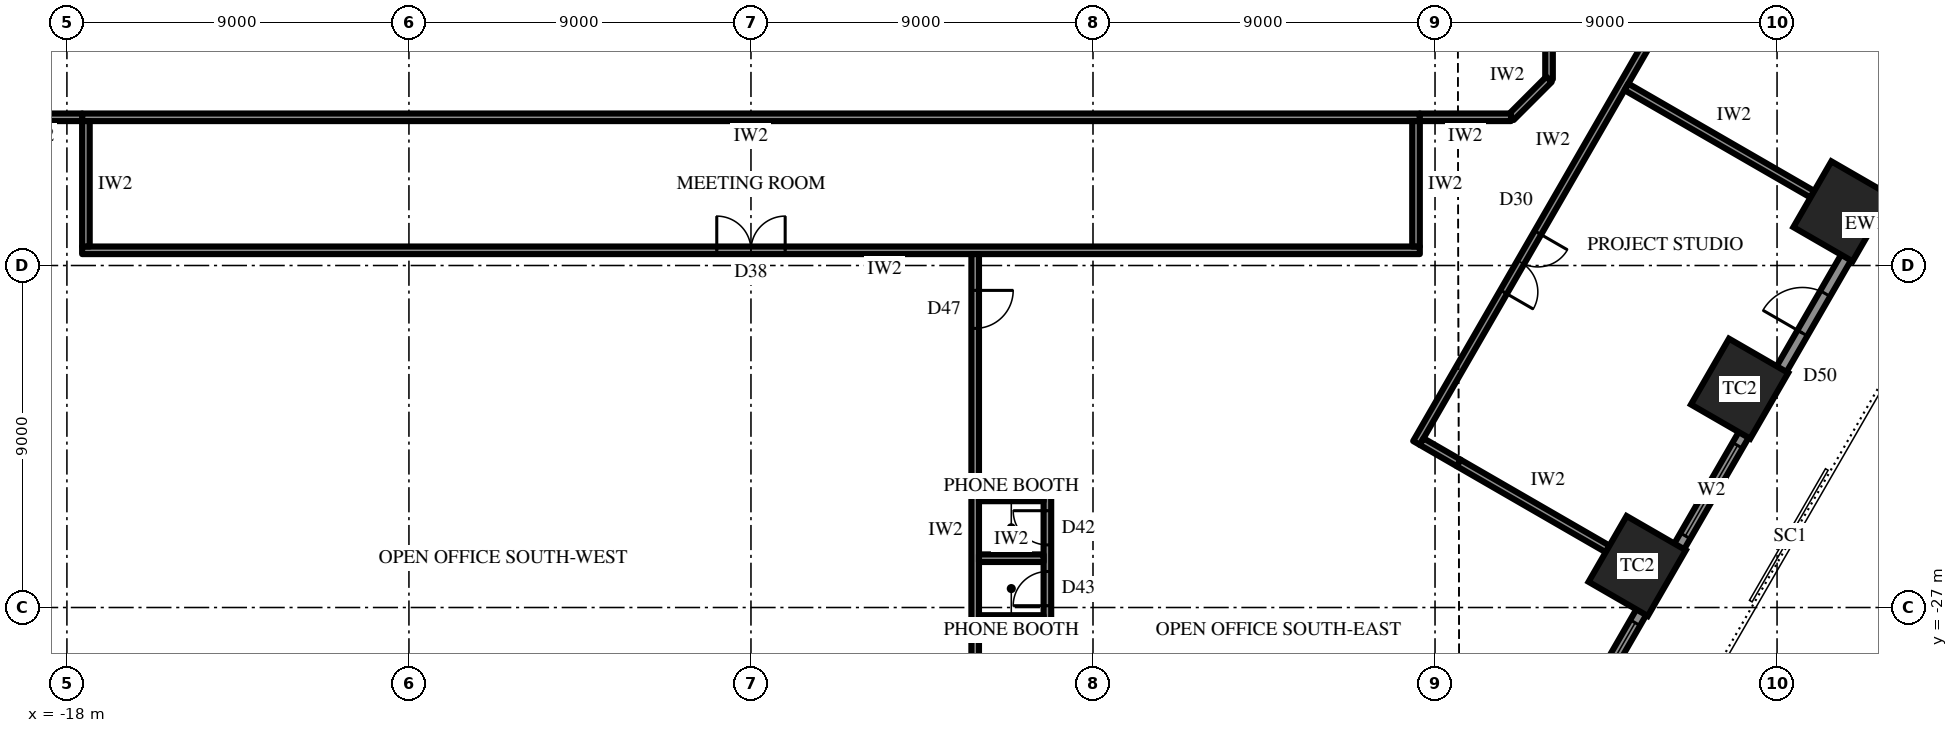
"""IFC4 building model, lengths in metres.
Left out: names, types, materials, properties, quantities, classifications, styles, units other than length and angle.
Written with IfcOpenShell. Run it as: python <this file> out.ifc"""

import sys

from ifc_helpers import new_model, si_unit, direction, frame, frame_2d, origin, origin_2d, place, context, subcontext, project, spatial, rectangle, extrude, element, fill, save


model = new_model("IFC4")
c1 = context("Model", 3, precision=1e-05, world=origin(), true_north=direction((0.0, 1.0)))
c2 = subcontext(c1, "Body", "Model", "MODEL_VIEW")
j1 = project(units=[si_unit("LENGTHUNIT", "METRE"), si_unit("PLANEANGLEUNIT", "RADIAN")], contexts=[c1])
p1 = place(None, origin())
s1 = spatial("IfcSite", under=j1, at=p1, CompositionType="ELEMENT")
p2 = place(p1, origin())
s2 = spatial("IfcBuilding", under=s1, at=p2, CompositionType="ELEMENT")
p3 = place(p2, frame((0.0, 0.0, 57.1)))
s3 = spatial("IfcBuildingStorey", under=s2, at=p3, CompositionType="ELEMENT", Elevation=57.1)
for number, where, z_axis, x_axis in (
    (1, (23.32, -25.908, 0.0), (0.0, 0.0, 1.0), (0.5, 0.866, 0.0)),
    (2, (26.014, -21.242, 0.0), (0.0, 0.0, 1.0), (0.5, 0.866, 0.0)),
    (3, (28.709, -16.575, 0.0), (0.0, 0.0, 1.0), (0.5, 0.866, 0.0)),
):
    element("IfcColumn", number, at=place(p3, frame(where, z_axis=z_axis, x_axis=x_axis)), inside=s3, PredefinedType="COLUMN", context=c2, shape_type="SweptSolid", body=[
        extrude(rectangle(XDim=2.0, YDim=1.8, at=origin_2d()), origin(), (0.0, 0.0, 1.0), 4.2),
    ])
p4 = place(p3, frame((21.232, -30.925, 0.0), z_axis=(0.0, 0.0, 1.0), x_axis=(0.499999163675, 0.866025886636, 0.0)))
e4 = element("IfcWall", 4, at=p4, inside=s3, PredefinedType="SOLIDWALL", context=c2, shape_type="SweptSolid", body=[
    extrude(rectangle(XDim=32.332, YDim=0.3, at=frame_2d((16.166, 0.0))), origin(), (0.0, 0.0, 1.0), 2.7),
])
p5 = place(p4, frame((1.319, 0.0, 0.6)))
e5 = element("IfcOpeningElement", 5, at=p5, cuts=e4, PredefinedType="OPENING", context=c2, shape_type="SweptSolid", body=[
    extrude(rectangle(XDim=2.75, YDim=1.85, at=frame_2d((1.375, 0.925))), frame((0.0, 0.16, 0.0), z_axis=(0.0, -1.0, 0.0), x_axis=(1.0, 0.0, 0.0)), (0.0, 0.0, 1.0), 0.32),
])
p6 = place(p4, frame((6.708, 0.0, 0.6)))
e6 = element("IfcOpeningElement", 6, at=p6, cuts=e4, PredefinedType="OPENING", context=c2, shape_type="SweptSolid", body=[
    extrude(rectangle(XDim=2.75, YDim=1.85, at=frame_2d((1.375, 0.925))), frame((0.0, 0.16, 0.0), z_axis=(0.0, -1.0, 0.0), x_axis=(1.0, 0.0, 0.0)), (0.0, 0.0, 1.0), 0.32),
])
p7 = place(p4, frame((12.872, 0.0, 0.0)))
e7 = element("IfcOpeningElement", 7, at=p7, cuts=e4, PredefinedType="OPENING", context=c2, shape_type="SweptSolid", body=[
    extrude(rectangle(XDim=1.2, YDim=2.4, at=frame_2d((0.6, 1.2))), frame((0.0, 0.16, 0.0), z_axis=(0.0, -1.0, 0.0), x_axis=(1.0, 0.0, 0.0)), (0.0, 0.0, 1.0), 0.32),
])
p8 = place(p4, frame((17.485, 0.0, 0.6)))
e8 = element("IfcOpeningElement", 8, at=p8, cuts=e4, PredefinedType="OPENING", context=c2, shape_type="SweptSolid", body=[
    extrude(rectangle(XDim=2.75, YDim=1.85, at=frame_2d((1.375, 0.925))), frame((0.0, 0.16, 0.0), z_axis=(0.0, -1.0, 0.0), x_axis=(1.0, 0.0, 0.0)), (0.0, 0.0, 1.0), 0.32),
])
p9 = place(p4, frame((22.874, 0.0, 0.6)))
e9 = element("IfcOpeningElement", 9, at=p9, cuts=e4, PredefinedType="OPENING", context=c2, shape_type="SweptSolid", body=[
    extrude(rectangle(XDim=2.75, YDim=1.85, at=frame_2d((1.375, 0.925))), frame((0.0, 0.16, 0.0), z_axis=(0.0, -1.0, 0.0), x_axis=(1.0, 0.0, 0.0)), (0.0, 0.0, 1.0), 0.32),
])
p10 = place(p4, frame((28.262, 0.0, 0.6)))
e10 = element("IfcOpeningElement", 10, at=p10, cuts=e4, PredefinedType="OPENING", context=c2, shape_type="SweptSolid", body=[
    extrude(rectangle(XDim=2.75, YDim=1.85, at=frame_2d((1.375, 0.925))), frame((0.0, 0.16, 0.0), z_axis=(0.0, -1.0, 0.0), x_axis=(1.0, 0.0, 0.0)), (0.0, 0.0, 1.0), 0.32),
])
p11 = place(p3, frame((17.6, -14.1, 0.0), z_axis=(0.0, 0.0, 1.0), x_axis=(-1.0, 0.0, 0.0)))
e11 = element("IfcWall", 11, at=p11, inside=s3, PredefinedType="PARTITIONING", context=c2, shape_type="SweptSolid", body=[
    extrude(rectangle(XDim=35.2, YDim=0.2, at=frame_2d((17.6, 0.0))), origin(), (0.0, 0.0, 1.0), 4.0),
])
p12 = place(p3, frame((17.6, -17.6, 0.0), z_axis=(0.0, 0.0, 1.0), x_axis=(-1.0, 0.0, 0.0)))
e12 = element("IfcWall", 12, at=p12, inside=s3, PredefinedType="PARTITIONING", context=c2, shape_type="SweptSolid", body=[
    extrude(rectangle(XDim=35.2, YDim=0.2, at=frame_2d((17.6, 0.0))), origin(), (0.0, 0.0, 1.0), 4.0),
])
p13 = place(p12, frame((16.7, 0.0, 0.0)))
e13 = element("IfcOpeningElement", 13, at=p13, cuts=e12, PredefinedType="OPENING", context=c2, shape_type="SweptSolid", body=[
    extrude(rectangle(XDim=1.8, YDim=2.4, at=frame_2d((0.9, 1.2))), frame((0.0, 0.11, 0.0), z_axis=(0.0, -1.0, 0.0), x_axis=(1.0, 0.0, 0.0)), (0.0, 0.0, 1.0), 0.22),
])
for number, where, z_axis, x_axis in (
    (14, (17.5, -14.2, 0.0), (0.0, 0.0, 1.0), (0.0, -1.0, 0.0)),
    (15, (-17.5, -14.2, 0.0), (0.0, 0.0, 1.0), (0.0, -1.0, 0.0)),
):
    element("IfcWall", number, at=place(p3, frame(where, z_axis=z_axis, x_axis=x_axis)), inside=s3, PredefinedType="PARTITIONING", context=c2, shape_type="SweptSolid", body=[
        extrude(rectangle(XDim=3.3, YDim=0.2, at=frame_2d((1.65, 0.0))), origin(), (0.0, 0.0, 1.0), 4.0),
    ])
p14 = place(p3, frame((17.511, -22.67, 0.0), z_axis=(0.0, 0.0, 1.0), x_axis=(0.500000289772, 0.866025236485, 0.0)))
e16 = element("IfcWall", 16, at=p14, inside=s3, PredefinedType="PARTITIONING", context=c2, shape_type="SweptSolid", body=[
    extrude(rectangle(XDim=21.754, YDim=0.2, at=frame_2d((10.877, 0.0))), origin(), (0.0, 0.0, 1.0), 4.0),
])
p15 = place(p14, frame((4.589, 0.0, 0.0)))
e17 = element("IfcOpeningElement", 17, at=p15, cuts=e16, PredefinedType="OPENING", context=c2, shape_type="SweptSolid", body=[
    extrude(rectangle(XDim=1.8, YDim=2.4, at=frame_2d((0.9, 1.2))), frame((0.0, 0.11, 0.0), z_axis=(0.0, -1.0, 0.0), x_axis=(1.0, 0.0, 0.0)), (0.0, 0.0, 1.0), 0.22),
])
p16 = place(p14, frame((15.366, 0.0, 0.0)))
e18 = element("IfcOpeningElement", 18, at=p16, cuts=e16, PredefinedType="OPENING", context=c2, shape_type="SweptSolid", body=[
    extrude(rectangle(XDim=1.8, YDim=2.4, at=frame_2d((0.9, 1.2))), frame((0.0, 0.11, 0.0), z_axis=(0.0, -1.0, 0.0), x_axis=(1.0, 0.0, 0.0)), (0.0, 0.0, 1.0), 0.22),
])
p17 = place(p3, frame((17.648, -22.633, 0.0), z_axis=(0.0, 0.0, 1.0), x_axis=(0.86603400694, -0.499985098601, 0.0)))
e19 = element("IfcWall", 19, at=p17, inside=s3, PredefinedType="PARTITIONING", context=c2, shape_type="SweptSolid", body=[
    extrude(rectangle(XDim=1.126, YDim=0.2, at=frame_2d((0.563, 0.0))), origin(), (0.0, 0.0, 1.0), 4.0),
])
p18 = place(p3, frame((18.623, -23.197, 0.0), z_axis=(0.0, 0.0, 1.0), x_axis=(0.866029199568, -0.499993425452, 0.0)))
e20 = element("IfcWall", 20, at=p18, inside=s3, PredefinedType="PARTITIONING", context=c2, shape_type="SweptSolid", body=[
    extrude(rectangle(XDim=4.523, YDim=0.2, at=frame_2d((2.262, 0.0))), origin(), (0.0, 0.0, 1.0), 2.992),
])
p19 = place(p3, frame((23.036, -13.3, 0.0), z_axis=(0.0, 0.0, 1.0), x_axis=(0.866019355129, -0.500010476433, 0.0)))
e21 = element("IfcWall", 21, at=p19, inside=s3, PredefinedType="PARTITIONING", context=c2, shape_type="SweptSolid", body=[
    extrude(rectangle(XDim=5.65, YDim=0.2, at=frame_2d((2.825, 0.0))), origin(), (0.0, 0.0, 1.0), 4.0),
])
p20 = place(p3, frame((21.0, 13.1, 0.0), z_axis=(0.0, 0.0, 1.0), x_axis=(0.0, -1.0, 0.0)))
e22 = element("IfcWall", 22, at=p20, inside=s3, PredefinedType="PARTITIONING", context=c2, shape_type="SweptSolid", body=[
    extrude(rectangle(XDim=26.2, YDim=0.2, at=frame_2d((13.1, 0.0))), origin(), (0.0, 0.0, 1.0), 4.0),
])
p21 = place(p20, frame((12.2, 0.0, 0.0)))
e23 = element("IfcOpeningElement", 23, at=p21, cuts=e22, PredefinedType="OPENING", context=c2, shape_type="SweptSolid", body=[
    extrude(rectangle(XDim=1.8, YDim=2.4, at=frame_2d((0.9, 1.2))), frame((0.0, 0.11, 0.0), z_axis=(0.0, -1.0, 0.0), x_axis=(1.0, 0.0, 0.0)), (0.0, 0.0, 1.0), 0.22),
])
p22 = place(p3, frame((21.0, -13.1, 0.0), z_axis=(0.0, 0.0, 1.0), x_axis=(-0.707106781187, -0.707106781187, 0.0)))
e24 = element("IfcWall", 24, at=p22, inside=s3, PredefinedType="PARTITIONING", context=c2, shape_type="SweptSolid", body=[
    extrude(rectangle(XDim=1.414, YDim=0.2, at=frame_2d((0.707, 0.0))), origin(), (0.0, 0.0, 1.0), 4.0),
])
for number, where, z_axis, x_axis in (
    (25, (-17.6, -14.1, 0.0), (0.0, 0.0, 1.0), (-1.0, 0.0, 0.0)),
    (26, (20.0, -14.1, 0.0), (0.0, 0.0, 1.0), (-1.0, 0.0, 0.0)),
):
    element("IfcWall", number, at=place(p3, frame(where, z_axis=z_axis, x_axis=x_axis)), inside=s3, PredefinedType="PARTITIONING", context=c2, shape_type="SweptSolid", body=[
        extrude(rectangle(XDim=2.4, YDim=0.2, at=frame_2d((1.2, 0.0))), origin(), (0.0, 0.0, 1.0), 4.0),
    ])
p23 = place(p3, frame((5.9, -17.7, 0.0), z_axis=(0.0, 0.0, 1.0), x_axis=(0.0, -1.0, 0.0)))
e27 = element("IfcWall", 27, at=p23, inside=s3, PredefinedType="PARTITIONING", context=c2, shape_type="SweptSolid", body=[
    extrude(rectangle(XDim=14.55, YDim=0.2, at=frame_2d((7.275, 0.0))), origin(), (0.0, 0.0, 1.0), 4.0),
])
p24 = place(p23, frame((0.955, 0.0, 0.0)))
e28 = element("IfcOpeningElement", 28, at=p24, cuts=e27, PredefinedType="OPENING", context=c2, shape_type="SweptSolid", body=[
    extrude(rectangle(XDim=1.0, YDim=2.2, at=frame_2d((0.5, 1.1))), frame((0.0, 0.11, 0.0), z_axis=(0.0, -1.0, 0.0), x_axis=(1.0, 0.0, 0.0)), (0.0, 0.0, 1.0), 0.22),
])
p25 = place(p3, frame((7.8, -24.002, 0.0), z_axis=(0.0, 0.0, 1.0), x_axis=(0.0, -1.0, 0.0)))
e29 = element("IfcWall", 29, at=p25, inside=s3, PredefinedType="PARTITIONING", context=c2, shape_type="SweptSolid", body=[
    extrude(rectangle(XDim=3.4, YDim=0.2, at=frame_2d((1.7, 0.0))), origin(), (0.0, 0.0, 1.0), 4.0),
])
p26 = place(p25, frame((0.45, 0.0, 0.0)))
e30 = element("IfcOpeningElement", 30, at=p26, cuts=e29, PredefinedType="OPENING", context=c2, shape_type="SweptSolid", body=[
    extrude(rectangle(XDim=0.9, YDim=2.2, at=frame_2d((0.45, 1.1))), frame((0.0, 0.11, 0.0), z_axis=(0.0, -1.0, 0.0), x_axis=(1.0, 0.0, 0.0)), (0.0, 0.0, 1.0), 0.22),
])
p27 = place(p25, frame((2.05, 0.0, 0.0)))
e31 = element("IfcOpeningElement", 31, at=p27, cuts=e29, PredefinedType="OPENING", context=c2, shape_type="SweptSolid", body=[
    extrude(rectangle(XDim=0.9, YDim=2.2, at=frame_2d((0.45, 1.1))), frame((0.0, 0.11, 0.0), z_axis=(0.0, -1.0, 0.0), x_axis=(1.0, 0.0, 0.0)), (0.0, 0.0, 1.0), 0.22),
])
for number, where, z_axis, x_axis in (
    (32, (6.0, -24.103, 0.0), (0.0, 0.0, 1.0), (1.0, 0.0, 0.0)),
    (33, (6.0, -25.702, 0.0), (0.0, 0.0, 1.0), (1.0, 0.0, 0.0)),
    (34, (6.0, -27.302, 0.0), (0.0, 0.0, 1.0), (1.0, 0.0, 0.0)),
):
    element("IfcWall", number, at=place(p3, frame(where, z_axis=z_axis, x_axis=x_axis)), inside=s3, PredefinedType="PARTITIONING", context=c2, shape_type="SweptSolid", body=[
        extrude(rectangle(XDim=1.7, YDim=0.2, at=frame_2d((0.85, 0.0))), origin(), (0.0, 0.0, 1.0), 4.0),
    ])
p28 = place(p5, origin())
e35 = element("IfcWindow", 35, at=p28, inside=s3, PartitioningType="SINGLE_PANEL", PredefinedType="WINDOW", context=c2, shape_type="SweptSolid", body=[
    extrude(rectangle(XDim=2.75, YDim=1.85, at=frame_2d((1.375, 0.925))), frame((0.0, 0.03, 0.0), z_axis=(0.0, -1.0, 0.0), x_axis=(1.0, 0.0, 0.0)), (0.0, 0.0, 1.0), 0.06),
])
fill(e5, e35)
p29 = place(p6, origin())
e36 = element("IfcWindow", 36, at=p29, inside=s3, PartitioningType="SINGLE_PANEL", PredefinedType="WINDOW", context=c2, shape_type="SweptSolid", body=[
    extrude(rectangle(XDim=2.75, YDim=1.85, at=frame_2d((1.375, 0.925))), frame((0.0, 0.03, 0.0), z_axis=(0.0, -1.0, 0.0), x_axis=(1.0, 0.0, 0.0)), (0.0, 0.0, 1.0), 0.06),
])
fill(e6, e36)
p30 = place(p7, origin())
e37 = element("IfcDoor", 37, at=p30, inside=s3, OperationType="SINGLE_SWING_RIGHT", PredefinedType="DOOR", context=c2, shape_type="SweptSolid", body=[
    extrude(rectangle(XDim=1.2, YDim=2.4, at=frame_2d((0.6, 1.2))), frame((0.0, 0.025, 0.0), z_axis=(0.0, -1.0, 0.0), x_axis=(1.0, 0.0, 0.0)), (0.0, 0.0, 1.0), 0.05),
])
fill(e7, e37)
p31 = place(p13, frame((1.8, 0.0, 0.0), z_axis=(0.0, 0.0, 1.0), x_axis=(-1.0, 0.0, 0.0)))
e38 = element("IfcDoor", 38, at=p31, inside=s3, OperationType="DOUBLE_DOOR_SINGLE_SWING", PredefinedType="DOOR", context=c2, shape_type="SweptSolid", body=[
    extrude(rectangle(XDim=1.8, YDim=2.4, at=frame_2d((0.9, 1.2))), frame((0.0, 0.025, 0.0), z_axis=(0.0, -1.0, 0.0), x_axis=(1.0, 0.0, 0.0)), (0.0, 0.0, 1.0), 0.05),
])
fill(e13, e38)
p32 = place(p15, frame((1.8, 0.0, 0.0), z_axis=(0.0, 0.0, 1.0), x_axis=(-1.0, 0.0, 0.0)))
e39 = element("IfcDoor", 39, at=p32, inside=s3, OperationType="DOUBLE_DOOR_SINGLE_SWING", PredefinedType="DOOR", context=c2, shape_type="SweptSolid", body=[
    extrude(rectangle(XDim=1.8, YDim=2.4, at=frame_2d((0.9, 1.2))), frame((0.0, 0.025, 0.0), z_axis=(0.0, -1.0, 0.0), x_axis=(1.0, 0.0, 0.0)), (0.0, 0.0, 1.0), 0.05),
])
fill(e17, e39)
p33 = place(p24, origin())
e40 = element("IfcDoor", 40, at=p33, inside=s3, OperationType="SINGLE_SWING_RIGHT", PredefinedType="DOOR", context=c2, shape_type="SweptSolid", body=[
    extrude(rectangle(XDim=1.0, YDim=2.2, at=frame_2d((0.5, 1.1))), frame((0.0, 0.025, 0.0), z_axis=(0.0, -1.0, 0.0), x_axis=(1.0, 0.0, 0.0)), (0.0, 0.0, 1.0), 0.05),
])
fill(e28, e40)
p34 = place(p26, frame((0.9, 0.0, 0.0), z_axis=(0.0, 0.0, 1.0), x_axis=(-1.0, 0.0, 0.0)))
e41 = element("IfcDoor", 41, at=p34, inside=s3, OperationType="SINGLE_SWING_LEFT", PredefinedType="DOOR", context=c2, shape_type="SweptSolid", body=[
    extrude(rectangle(XDim=0.9, YDim=2.2, at=frame_2d((0.45, 1.1))), frame((0.0, 0.025, 0.0), z_axis=(0.0, -1.0, 0.0), x_axis=(1.0, 0.0, 0.0)), (0.0, 0.0, 1.0), 0.05),
])
fill(e30, e41)
p35 = place(p27, frame((0.9, 0.0, 0.0), z_axis=(0.0, 0.0, 1.0), x_axis=(-1.0, 0.0, 0.0)))
e42 = element("IfcDoor", 42, at=p35, inside=s3, OperationType="SINGLE_SWING_RIGHT", PredefinedType="DOOR", context=c2, shape_type="SweptSolid", body=[
    extrude(rectangle(XDim=0.9, YDim=2.2, at=frame_2d((0.45, 1.1))), frame((0.0, 0.025, 0.0), z_axis=(0.0, -1.0, 0.0), x_axis=(1.0, 0.0, 0.0)), (0.0, 0.0, 1.0), 0.05),
])
fill(e31, e42)
save(model, sys.argv[1])
